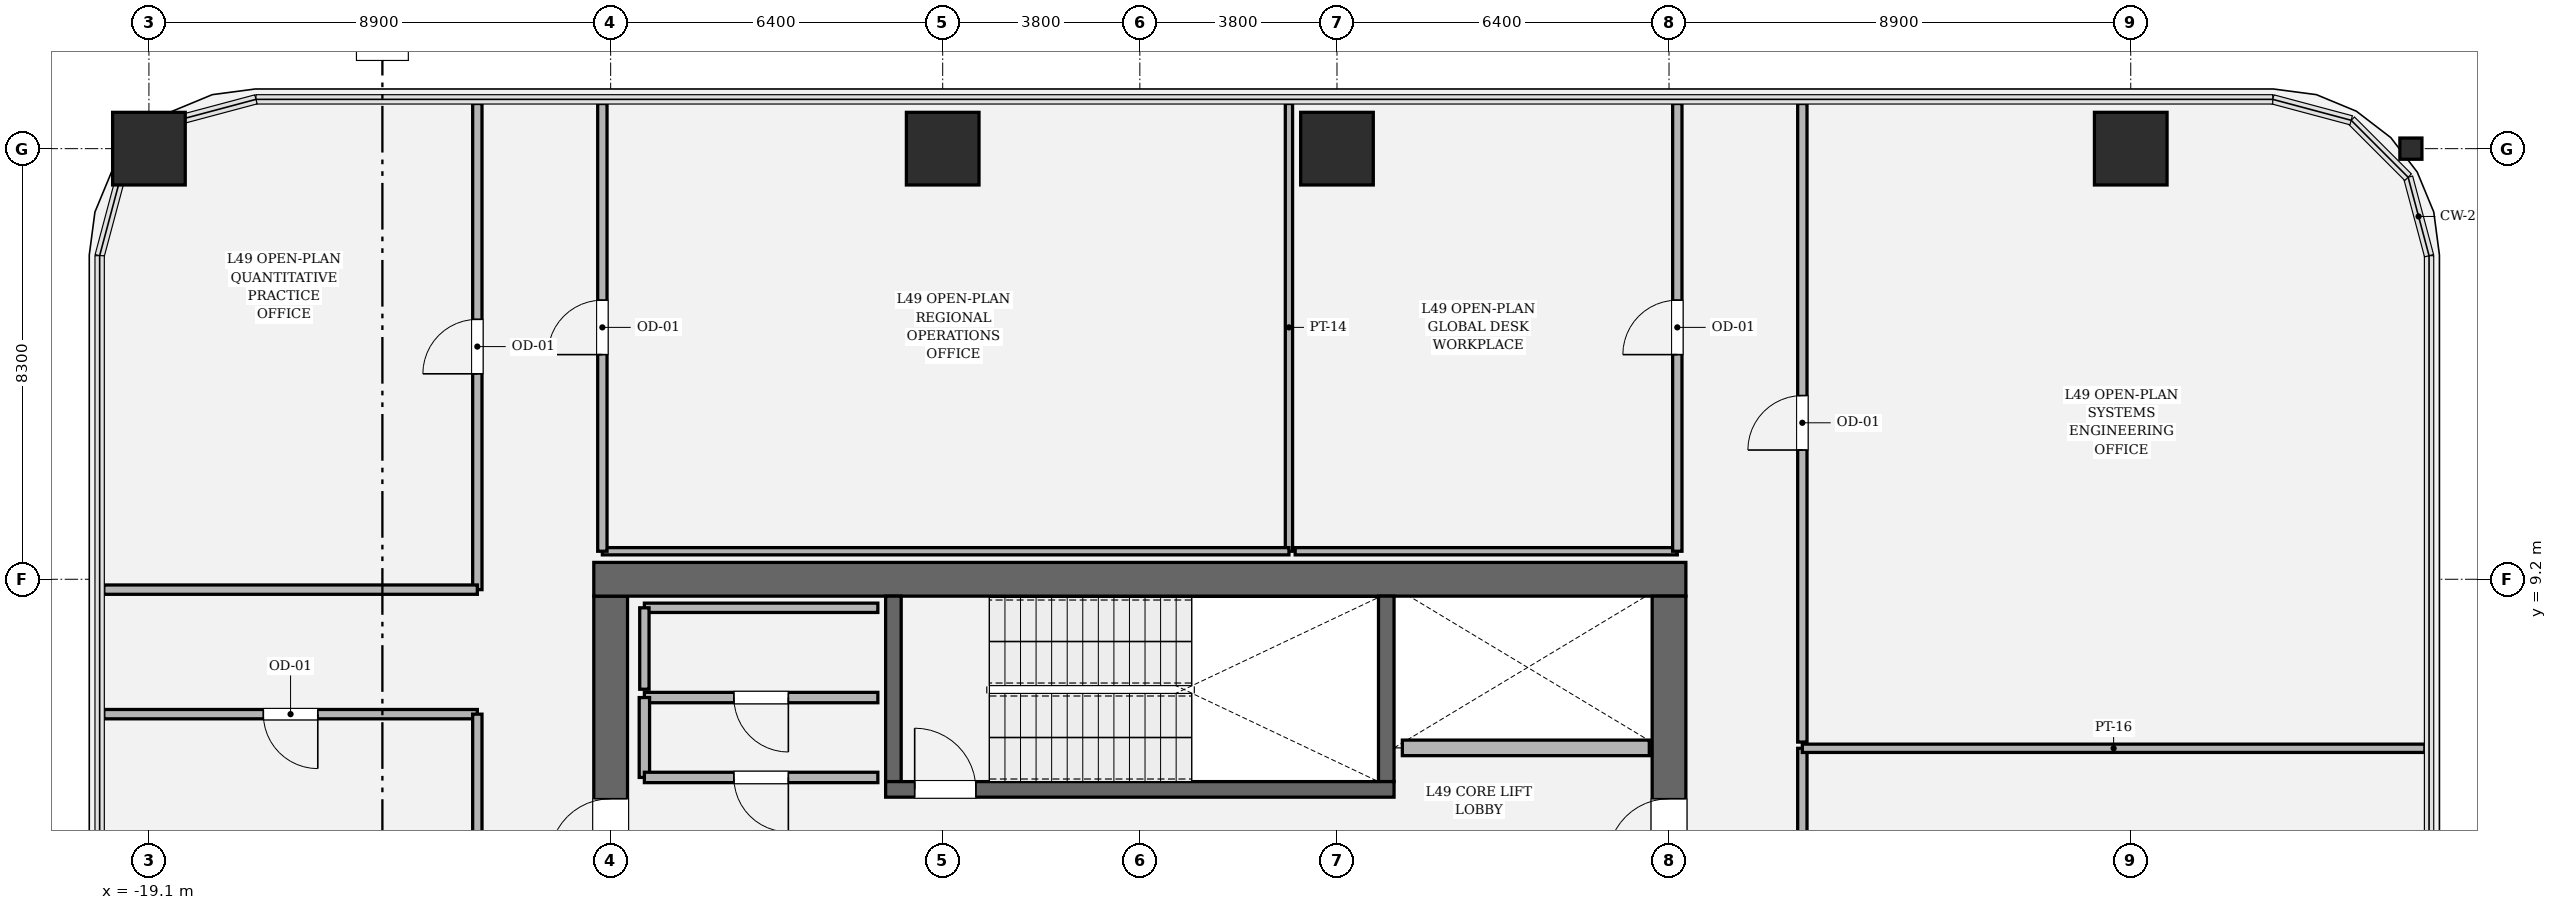
"""IFC4 building model, lengths in metres.
Left out: names, types, materials, properties, quantities, classifications, styles, units other than length and angle.
Written with IfcOpenShell. Run it as: python <this file> out.ifc"""

import sys

from ifc_helpers import new_model, si_unit, direction, frame, frame_2d, origin, origin_2d, place, context, subcontext, project, spatial, rectangle, hollow_rectangle, i_section, extrude, element, fill, save


model = new_model("IFC4")
c1 = context("Model", 3, precision=1e-05, world=origin(), true_north=direction((0.0, 1.0)))
c2 = subcontext(c1, "Body", "Model", "MODEL_VIEW")
j1 = project(units=[si_unit("LENGTHUNIT", "METRE"), si_unit("PLANEANGLEUNIT", "RADIAN")], contexts=[c1])
p1 = place(None, origin())
s1 = spatial("IfcSite", under=j1, at=p1, CompositionType="ELEMENT")
p2 = place(p1, origin())
s2 = spatial("IfcBuilding", under=s1, at=p2, CompositionType="ELEMENT")
p3 = place(p2, frame((0.0, 0.0, 208.65)))
s3 = spatial("IfcBuildingStorey", under=s2, at=p3, CompositionType="ELEMENT", Elevation=208.65)
p4 = place(p3, frame((-10.2, -8.875, 0.0), z_axis=(0.0, 0.0, 1.0), x_axis=(0.0, 1.0, 0.0)))
e1 = element("IfcWall", 1, at=p4, inside=s3, PredefinedType="SHEAR", context=c2, shape_type="SweptSolid", body=[
    extrude(rectangle(XDim=17.75, YDim=0.65, at=frame_2d((8.875, 0.0))), origin(), (0.0, 0.0, 1.0), 4.05),
])
p5 = place(p4, frame((12.665, 0.0, 0.0)))
e2 = element("IfcOpeningElement", 2, at=p5, cuts=e1, PredefinedType="OPENING", context=c2, shape_type="SweptSolid", body=[
    extrude(rectangle(XDim=1.18, YDim=2.2, at=frame_2d((0.59, 1.1))), frame((0.0, 0.335, 0.0), z_axis=(0.0, -1.0, 0.0), x_axis=(1.0, 0.0, 0.0)), (0.0, 0.0, 1.0), 0.67),
])
p6 = place(p3, frame((-10.525, 9.2, 0.0), z_axis=(0.0, 0.0, 1.0), x_axis=(1.0, 0.0, 0.0)))
e3 = element("IfcWall", 3, at=p6, inside=s3, PredefinedType="SHEAR", context=c2, shape_type="SweptSolid", body=[
    extrude(rectangle(XDim=21.05, YDim=0.65, at=frame_2d((10.525, 0.0))), origin(), (0.0, 0.0, 1.0), 4.05),
])
p7 = place(p3, frame((10.2, 8.875, 0.0), z_axis=(0.0, 0.0, 1.0), x_axis=(0.0, -1.0, 0.0)))
e4 = element("IfcWall", 4, at=p7, inside=s3, PredefinedType="SHEAR", context=c2, shape_type="SweptSolid", body=[
    extrude(rectangle(XDim=17.75, YDim=0.65, at=frame_2d((8.875, 0.0))), origin(), (0.0, 0.0, 1.0), 4.05),
])
p8 = place(p7, frame((3.905, 0.0, 0.0)))
e5 = element("IfcOpeningElement", 5, at=p8, cuts=e4, PredefinedType="OPENING", context=c2, shape_type="SweptSolid", body=[
    extrude(rectangle(XDim=1.18, YDim=2.2, at=frame_2d((0.59, 1.1))), frame((0.0, 0.335, 0.0), z_axis=(0.0, -1.0, 0.0), x_axis=(1.0, 0.0, 0.0)), (0.0, 0.0, 1.0), 0.67),
])
for number, where, z_axis, x_axis in (
    (6, (-4.75, 5.3, 0.0), (0.0, 0.0, 1.0), (0.0, 1.0, 0.0)),
    (7, (4.75, 8.875, 0.0), (0.0, 0.0, 1.0), (0.0, -1.0, 0.0)),
):
    element("IfcWall", number, at=place(p3, frame(where, z_axis=z_axis, x_axis=x_axis)), inside=s3, PredefinedType="SOLIDWALL", context=c2, shape_type="SweptSolid", body=[
        extrude(rectangle(XDim=3.575, YDim=0.3, at=frame_2d((1.788, 0.0))), origin(), (0.0, 0.0, 1.0), 4.05),
    ])
p9 = place(p3, frame((-4.9, 5.15, 0.0), z_axis=(0.0, 0.0, 1.0), x_axis=(1.0, 0.0, 0.0)))
e8 = element("IfcWall", 8, at=p9, inside=s3, PredefinedType="SOLIDWALL", context=c2, shape_type="SweptSolid", body=[
    extrude(rectangle(XDim=9.8, YDim=0.3, at=frame_2d((4.9, 0.0))), origin(), (0.0, 0.0, 1.0), 4.05),
])
p10 = place(p9, frame((0.56, 0.0, 0.0)))
e9 = element("IfcOpeningElement", 9, at=p10, cuts=e8, PredefinedType="OPENING", context=c2, shape_type="SweptSolid", body=[
    extrude(rectangle(XDim=1.18, YDim=2.2, at=frame_2d((0.59, 1.1))), frame((0.0, 0.16, 0.0), z_axis=(0.0, -1.0, 0.0), x_axis=(1.0, 0.0, 0.0)), (0.0, 0.0, 1.0), 0.32),
])
for number, where, z_axis, x_axis in (
    (10, (19.1, 17.5, 0.0), (0.0, 0.0, 1.0), (1.0, 0.0, 0.0)),
    (11, (3.8, 17.5, 0.0), (0.0, 0.0, 1.0), (1.0, 0.0, 0.0)),
    (12, (-3.8, 17.5, 0.0), (0.0, 0.0, 1.0), (1.0, 0.0, 0.0)),
    (13, (-19.1, 17.5, 0.0), (0.0, 0.0, 1.0), (1.0, 0.0, 0.0)),
):
    element("IfcColumn", number, at=place(p3, frame(where, z_axis=z_axis, x_axis=x_axis)), inside=s3, PredefinedType="COLUMN", context=c2, shape_type="SweptSolid", body=[
        extrude(hollow_rectangle(XDim=1.4, YDim=1.4, WallThickness=0.042, at=origin_2d()), origin(), (0.0, 0.0, 1.0), 4.05),
    ])
p11 = place(p3, frame((24.5, 17.5, 0.0), z_axis=(0.0, 0.0, 1.0), x_axis=(0.0, 1.0, 0.0)))
e14 = element("IfcColumn", 14, at=p11, inside=s3, PredefinedType="COLUMN", context=c2, shape_type="SweptSolid", body=[
    extrude(i_section(OverallWidth=0.409, OverallDepth=0.425, WebThickness=0.032, FlangeThickness=0.052, FilletRadius=0.018, at=origin_2d()), origin(), (0.0, 0.0, 1.0), 4.048),
])
p12 = place(p3, frame((5.06, 5.95, 0.0), z_axis=(0.0, 0.0, 1.0), x_axis=(1.0, 0.0, 0.0)))
e15 = element("IfcWall", 15, at=p12, inside=s3, PredefinedType="SOLIDWALL", context=c2, shape_type="SweptSolid", body=[
    extrude(rectangle(XDim=4.76, YDim=0.3, at=frame_2d((2.38, 0.0))), origin(), (0.0, 0.0, 1.0), 3.83),
])
p13 = place(p3, frame((-5.05, 6.92, 0.0), z_axis=(0.0, 0.0, 1.0), x_axis=(-1.0, 0.0, 0.0)))
e16 = element("IfcWall", 16, at=p13, inside=s3, PredefinedType="SOLIDWALL", context=c2, shape_type="SweptSolid", body=[
    extrude(rectangle(XDim=4.5, YDim=0.2, at=frame_2d((2.25, 0.0))), origin(), (0.0, 0.0, 1.0), 3.83),
])
p14 = place(p13, frame((1.725, 0.0, 0.0)))
e17 = element("IfcOpeningElement", 17, at=p14, cuts=e16, PredefinedType="OPENING", context=c2, shape_type="SweptSolid", body=[
    extrude(rectangle(XDim=1.05, YDim=2.2, at=frame_2d((0.525, 1.1))), frame((0.0, 0.11, 0.0), z_axis=(0.0, -1.0, 0.0), x_axis=(1.0, 0.0, 0.0)), (0.0, 0.0, 1.0), 0.22),
])
p15 = place(p3, frame((-9.55, 6.92, 0.0), z_axis=(0.0, 0.0, 1.0), x_axis=(0.0, -1.0, 0.0)))
e18 = element("IfcWall", 18, at=p15, inside=s3, PredefinedType="SOLIDWALL", context=c2, shape_type="SweptSolid", body=[
    extrude(rectangle(XDim=1.54, YDim=0.2, at=frame_2d((0.77, 0.0))), origin(), (0.0, 0.0, 1.0), 3.83),
])
p16 = place(p3, frame((-9.55, 5.38, 0.0), z_axis=(0.0, 0.0, 1.0), x_axis=(1.0, 0.0, 0.0)))
e19 = element("IfcWall", 19, at=p16, inside=s3, PredefinedType="SOLIDWALL", context=c2, shape_type="SweptSolid", body=[
    extrude(rectangle(XDim=4.5, YDim=0.2, at=frame_2d((2.25, 0.0))), origin(), (0.0, 0.0, 1.0), 3.83),
])
p17 = place(p16, frame((1.725, 0.0, 0.0)))
e20 = element("IfcOpeningElement", 20, at=p17, cuts=e19, PredefinedType="OPENING", context=c2, shape_type="SweptSolid", body=[
    extrude(rectangle(XDim=1.05, YDim=2.2, at=frame_2d((0.525, 1.1))), frame((0.0, 0.11, 0.0), z_axis=(0.0, -1.0, 0.0), x_axis=(1.0, 0.0, 0.0)), (0.0, 0.0, 1.0), 0.22),
])
p18 = place(p3, frame((-5.05, 8.65, 0.0), z_axis=(0.0, 0.0, 1.0), x_axis=(-1.0, 0.0, 0.0)))
e21 = element("IfcWall", 21, at=p18, inside=s3, PredefinedType="PARTITIONING", context=c2, shape_type="SweptSolid", body=[
    extrude(rectangle(XDim=4.5, YDim=0.18, at=frame_2d((2.25, 0.0))), origin(), (0.0, 0.0, 1.0), 3.83),
])
p19 = place(p3, frame((-9.55, 8.65, 0.0), z_axis=(0.0, 0.0, 1.0), x_axis=(0.0, -1.0, 0.0)))
e22 = element("IfcWall", 22, at=p19, inside=s3, PredefinedType="PARTITIONING", context=c2, shape_type="SweptSolid", body=[
    extrude(rectangle(XDim=1.57, YDim=0.18, at=frame_2d((0.785, 0.0))), origin(), (0.0, 0.0, 1.0), 3.83),
])
p20 = place(p3, frame((12.77, -4.318, 0.0), z_axis=(0.0, 0.0, 1.0), x_axis=(0.0, 1.0, 0.0)))
e23 = element("IfcWall", 23, at=p20, inside=s3, PredefinedType="PARTITIONING", context=c2, shape_type="SweptSolid", body=[
    extrude(rectangle(XDim=10.26, YDim=0.18, at=frame_2d((5.13, 0.0))), origin(), (0.0, 0.0, 1.0), 3.174),
])
p21 = place(p20, frame((4.605, 0.0, 0.0)))
e24 = element("IfcOpeningElement", 24, at=p21, cuts=e23, PredefinedType="OPENING", context=c2, shape_type="SweptSolid", body=[
    extrude(rectangle(XDim=1.05, YDim=2.2, at=frame_2d((0.525, 1.1))), frame((0.0, 0.1, 0.0), z_axis=(0.0, -1.0, 0.0), x_axis=(1.0, 0.0, 0.0)), (0.0, 0.0, 1.0), 0.2),
])
p22 = place(p3, frame((12.77, 5.942, 0.0), z_axis=(0.0, 0.0, 1.0), x_axis=(1.0, 0.0, 0.0)))
e25 = element("IfcWall", 25, at=p22, inside=s3, PredefinedType="PARTITIONING", context=c2, shape_type="SweptSolid", body=[
    extrude(rectangle(XDim=12.0, YDim=0.16, at=frame_2d((6.0, 0.0))), origin(), (0.0, 0.0, 1.0), 2.544),
])
p23 = place(p3, frame((-19.97, 6.6, 0.0), z_axis=(0.0, 0.0, 1.0), x_axis=(1.0, 0.0, 0.0)))
e26 = element("IfcWall", 26, at=p23, inside=s3, PredefinedType="PARTITIONING", context=c2, shape_type="SweptSolid", body=[
    extrude(rectangle(XDim=7.2, YDim=0.18, at=frame_2d((3.6, 0.0))), origin(), (0.0, 0.0, 1.0), 3.174),
])
p24 = place(p23, frame((3.075, 0.0, 0.0)))
e27 = element("IfcOpeningElement", 27, at=p24, cuts=e26, PredefinedType="OPENING", context=c2, shape_type="SweptSolid", body=[
    extrude(rectangle(XDim=1.05, YDim=2.2, at=frame_2d((0.525, 1.1))), frame((0.0, 0.1, 0.0), z_axis=(0.0, -1.0, 0.0), x_axis=(1.0, 0.0, 0.0)), (0.0, 0.0, 1.0), 0.2),
])
p25 = place(p3, frame((-12.77, 6.6, 0.0), z_axis=(0.0, 0.0, 1.0), x_axis=(0.0, -1.0, 0.0)))
e28 = element("IfcWall", 28, at=p25, inside=s3, PredefinedType="PARTITIONING", context=c2, shape_type="SweptSolid", body=[
    extrude(rectangle(XDim=10.918, YDim=0.18, at=frame_2d((5.459, 0.0))), origin(), (0.0, 0.0, 1.0), 3.174),
])
p26 = place(p3, frame((12.77, 6.062, 0.0), z_axis=(0.0, 0.0, 1.0), x_axis=(0.0, 1.0, 0.0)))
e29 = element("IfcWall", 29, at=p26, inside=s3, PredefinedType="PARTITIONING", context=c2, shape_type="SweptSolid", body=[
    extrude(rectangle(XDim=12.308, YDim=0.18, at=frame_2d((6.154, 0.0))), origin(), (0.0, 0.0, 1.0), 3.174),
])
p27 = place(p26, frame((5.629, 0.0, 0.0)))
e30 = element("IfcOpeningElement", 30, at=p27, cuts=e29, PredefinedType="OPENING", context=c2, shape_type="SweptSolid", body=[
    extrude(rectangle(XDim=1.05, YDim=2.2, at=frame_2d((0.525, 1.1))), frame((0.0, 0.1, 0.0), z_axis=(0.0, -1.0, 0.0), x_axis=(1.0, 0.0, 0.0)), (0.0, 0.0, 1.0), 0.2),
])
p28 = place(p3, frame((-12.77, 18.37, 0.0), z_axis=(0.0, 0.0, 1.0), x_axis=(0.0, -1.0, 0.0)))
e31 = element("IfcWall", 31, at=p28, inside=s3, PredefinedType="PARTITIONING", context=c2, shape_type="SweptSolid", body=[
    extrude(rectangle(XDim=9.37, YDim=0.18, at=frame_2d((4.685, 0.0))), origin(), (0.0, 0.0, 1.0), 3.174),
])
p29 = place(p28, frame((4.16, 0.0, 0.0)))
e32 = element("IfcOpeningElement", 32, at=p29, cuts=e31, PredefinedType="OPENING", context=c2, shape_type="SweptSolid", body=[
    extrude(rectangle(XDim=1.05, YDim=2.2, at=frame_2d((0.525, 1.1))), frame((0.0, 0.1, 0.0), z_axis=(0.0, -1.0, 0.0), x_axis=(1.0, 0.0, 0.0)), (0.0, 0.0, 1.0), 0.2),
])
p30 = place(p3, frame((-12.77, 9.0, 0.0), z_axis=(0.0, 0.0, 1.0), x_axis=(-1.0, 0.0, 0.0)))
e33 = element("IfcWall", 33, at=p30, inside=s3, PredefinedType="PARTITIONING", context=c2, shape_type="SweptSolid", body=[
    extrude(rectangle(XDim=7.2, YDim=0.18, at=frame_2d((3.6, 0.0))), origin(), (0.0, 0.0, 1.0), 3.174),
])
p31 = place(p3, frame((2.874, 18.37, 0.0), z_axis=(0.0, 0.0, 1.0), x_axis=(0.0, -1.0, 0.0)))
e34 = element("IfcWall", 34, at=p31, inside=s3, PredefinedType="PARTITIONING", context=c2, shape_type="SweptSolid", body=[
    extrude(rectangle(XDim=8.63, YDim=0.14, at=frame_2d((4.315, 0.0))), origin(), (0.0, 0.0, 1.0), 3.174),
])
p32 = place(p3, frame((2.874, 9.74, 0.0), z_axis=(0.0, 0.0, 1.0), x_axis=(-1.0, 0.0, 0.0)))
e35 = element("IfcWall", 35, at=p32, inside=s3, PredefinedType="PARTITIONING", context=c2, shape_type="SweptSolid", body=[
    extrude(rectangle(XDim=13.234, YDim=0.14, at=frame_2d((6.617, 0.0))), origin(), (0.0, 0.0, 1.0), 3.174),
])
p33 = place(p3, frame((-10.36, 9.74, 0.0), z_axis=(0.0, 0.0, 1.0), x_axis=(0.0, 1.0, 0.0)))
e36 = element("IfcWall", 36, at=p33, inside=s3, PredefinedType="PARTITIONING", context=c2, shape_type="SweptSolid", body=[
    extrude(rectangle(XDim=8.63, YDim=0.18, at=frame_2d((4.315, 0.0))), origin(), (0.0, 0.0, 1.0), 3.174),
])
p34 = place(p33, frame((3.79, 0.0, 0.0)))
e37 = element("IfcOpeningElement", 37, at=p34, cuts=e36, PredefinedType="OPENING", context=c2, shape_type="SweptSolid", body=[
    extrude(rectangle(XDim=1.05, YDim=2.2, at=frame_2d((0.525, 1.1))), frame((0.0, 0.1, 0.0), z_axis=(0.0, -1.0, 0.0), x_axis=(1.0, 0.0, 0.0)), (0.0, 0.0, 1.0), 0.2),
])
p35 = place(p3, frame((10.36, 9.74, 0.0), z_axis=(0.0, 0.0, 1.0), x_axis=(-1.0, 0.0, 0.0)))
e38 = element("IfcWall", 38, at=p35, inside=s3, PredefinedType="PARTITIONING", context=c2, shape_type="SweptSolid", body=[
    extrude(rectangle(XDim=7.366, YDim=0.14, at=frame_2d((3.683, 0.0))), origin(), (0.0, 0.0, 1.0), 3.174),
])
p36 = place(p3, frame((10.36, 18.37, 0.0), z_axis=(0.0, 0.0, 1.0), x_axis=(0.0, -1.0, 0.0)))
e39 = element("IfcWall", 39, at=p36, inside=s3, PredefinedType="PARTITIONING", context=c2, shape_type="SweptSolid", body=[
    extrude(rectangle(XDim=8.63, YDim=0.18, at=frame_2d((4.315, 0.0))), origin(), (0.0, 0.0, 1.0), 3.174),
])
p37 = place(p36, frame((3.79, 0.0, 0.0)))
e40 = element("IfcOpeningElement", 40, at=p37, cuts=e39, PredefinedType="OPENING", context=c2, shape_type="SweptSolid", body=[
    extrude(rectangle(XDim=1.05, YDim=2.2, at=frame_2d((0.525, 1.1))), frame((0.0, 0.1, 0.0), z_axis=(0.0, -1.0, 0.0), x_axis=(1.0, 0.0, 0.0)), (0.0, 0.0, 1.0), 0.2),
])
p38 = place(p10, origin())
e41 = element("IfcDoor", 41, at=p38, inside=s3, OperationType="SINGLE_SWING_LEFT", PredefinedType="DOOR", context=c2, shape_type="SweptSolid", body=[
    extrude(rectangle(XDim=1.18, YDim=2.2, at=frame_2d((0.59, 1.1))), frame((0.0, 0.025, 0.0), z_axis=(0.0, -1.0, 0.0), x_axis=(1.0, 0.0, 0.0)), (0.0, 0.0, 1.0), 0.05),
])
fill(e9, e41)
p39 = place(p5, origin())
e42 = element("IfcDoor", 42, at=p39, inside=s3, OperationType="SINGLE_SWING_LEFT", PredefinedType="DOOR", context=c2, shape_type="SweptSolid", body=[
    extrude(rectangle(XDim=1.18, YDim=2.2, at=frame_2d((0.59, 1.1))), frame((0.0, 0.025, 0.0), z_axis=(0.0, -1.0, 0.0), x_axis=(1.0, 0.0, 0.0)), (0.0, 0.0, 1.0), 0.05),
])
fill(e2, e42)
p40 = place(p8, origin())
e43 = element("IfcDoor", 43, at=p40, inside=s3, OperationType="SINGLE_SWING_RIGHT", PredefinedType="DOOR", context=c2, shape_type="SweptSolid", body=[
    extrude(rectangle(XDim=1.18, YDim=2.2, at=frame_2d((0.59, 1.1))), frame((0.0, 0.025, 0.0), z_axis=(0.0, -1.0, 0.0), x_axis=(1.0, 0.0, 0.0)), (0.0, 0.0, 1.0), 0.05),
])
fill(e5, e43)
p41 = place(p17, origin())
e44 = element("IfcDoor", 44, at=p41, inside=s3, OperationType="SINGLE_SWING_RIGHT", PredefinedType="DOOR", context=c2, shape_type="SweptSolid", body=[
    extrude(rectangle(XDim=1.05, YDim=2.2, at=frame_2d((0.525, 1.1))), frame((0.0, 0.025, 0.0), z_axis=(0.0, -1.0, 0.0), x_axis=(1.0, 0.0, 0.0)), (0.0, 0.0, 1.0), 0.05),
])
fill(e20, e44)
p42 = place(p14, origin())
e45 = element("IfcDoor", 45, at=p42, inside=s3, OperationType="SINGLE_SWING_LEFT", PredefinedType="DOOR", context=c2, shape_type="SweptSolid", body=[
    extrude(rectangle(XDim=1.05, YDim=2.2, at=frame_2d((0.525, 1.1))), frame((0.0, 0.025, 0.0), z_axis=(0.0, -1.0, 0.0), x_axis=(1.0, 0.0, 0.0)), (0.0, 0.0, 1.0), 0.05),
])
fill(e17, e45)
p43 = place(p24, origin())
e46 = element("IfcDoor", 46, at=p43, inside=s3, OperationType="SINGLE_SWING_RIGHT", PredefinedType="DOOR", context=c2, shape_type="SweptSolid", body=[
    extrude(rectangle(XDim=1.05, YDim=2.2, at=frame_2d((0.525, 1.1))), frame((0.0, 0.025, 0.0), z_axis=(0.0, -1.0, 0.0), x_axis=(1.0, 0.0, 0.0)), (0.0, 0.0, 1.0), 0.05),
])
fill(e27, e46)
p44 = place(p27, origin())
e47 = element("IfcDoor", 47, at=p44, inside=s3, OperationType="SINGLE_SWING_LEFT", PredefinedType="DOOR", context=c2, shape_type="SweptSolid", body=[
    extrude(rectangle(XDim=1.05, YDim=2.2, at=frame_2d((0.525, 1.1))), frame((0.0, 0.025, 0.0), z_axis=(0.0, -1.0, 0.0), x_axis=(1.0, 0.0, 0.0)), (0.0, 0.0, 1.0), 0.05),
])
fill(e30, e47)
p45 = place(p29, origin())
e48 = element("IfcDoor", 48, at=p45, inside=s3, OperationType="SINGLE_SWING_RIGHT", PredefinedType="DOOR", context=c2, shape_type="SweptSolid", body=[
    extrude(rectangle(XDim=1.05, YDim=2.2, at=frame_2d((0.525, 1.1))), frame((0.0, 0.025, 0.0), z_axis=(0.0, -1.0, 0.0), x_axis=(1.0, 0.0, 0.0)), (0.0, 0.0, 1.0), 0.05),
])
fill(e32, e48)
p46 = place(p34, origin())
e49 = element("IfcDoor", 49, at=p46, inside=s3, OperationType="SINGLE_SWING_LEFT", PredefinedType="DOOR", context=c2, shape_type="SweptSolid", body=[
    extrude(rectangle(XDim=1.05, YDim=2.2, at=frame_2d((0.525, 1.1))), frame((0.0, 0.025, 0.0), z_axis=(0.0, -1.0, 0.0), x_axis=(1.0, 0.0, 0.0)), (0.0, 0.0, 1.0), 0.05),
])
fill(e37, e49)
p47 = place(p37, origin())
e50 = element("IfcDoor", 50, at=p47, inside=s3, OperationType="SINGLE_SWING_RIGHT", PredefinedType="DOOR", context=c2, shape_type="SweptSolid", body=[
    extrude(rectangle(XDim=1.05, YDim=2.2, at=frame_2d((0.525, 1.1))), frame((0.0, 0.025, 0.0), z_axis=(0.0, -1.0, 0.0), x_axis=(1.0, 0.0, 0.0)), (0.0, 0.0, 1.0), 0.05),
])
fill(e40, e50)
save(model, sys.argv[1])
